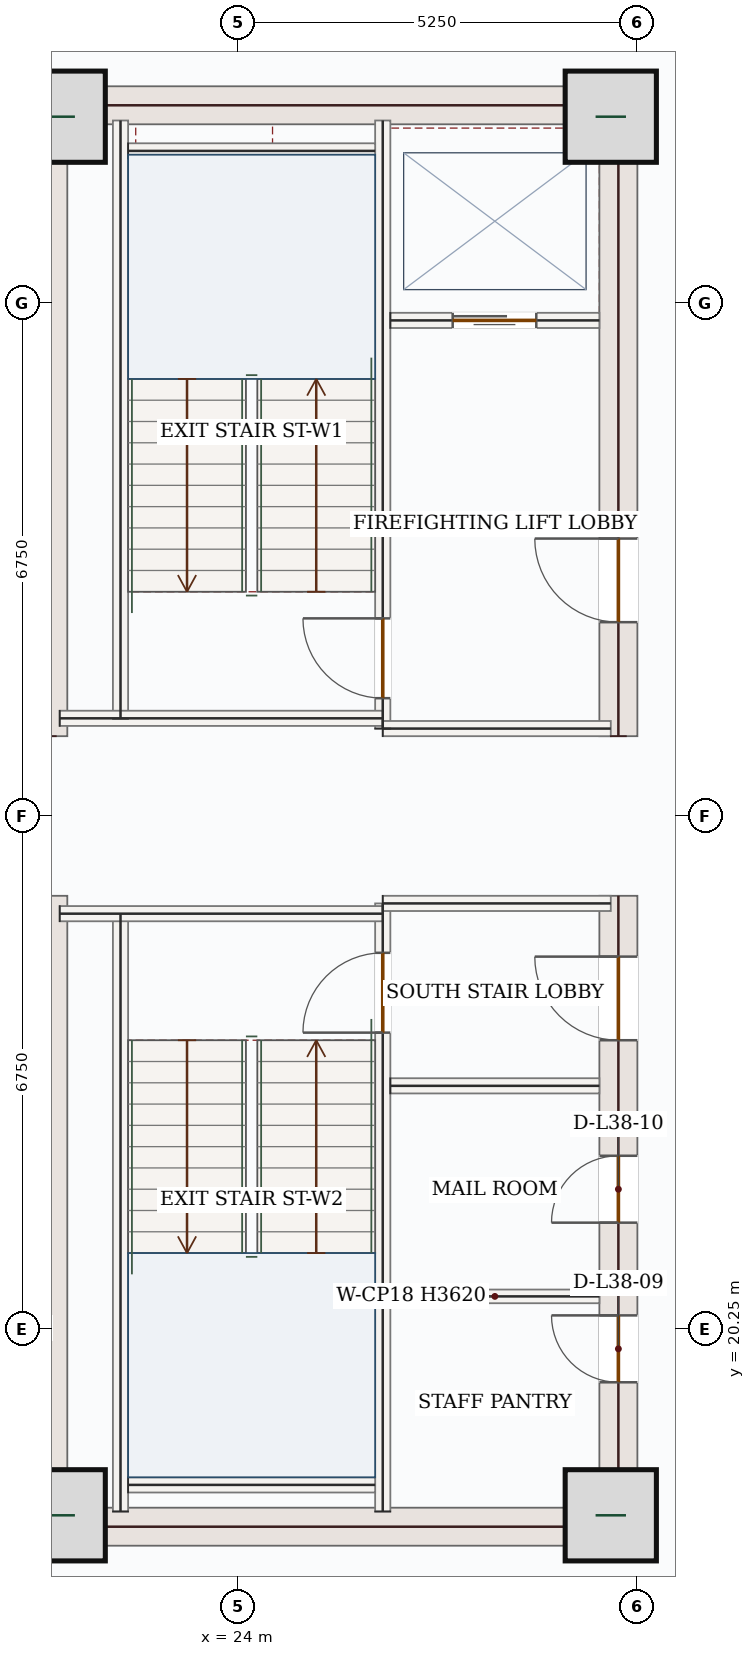
"""IFC4 building model, lengths in metres.
Left out: names, types, materials, properties, quantities, classifications, styles, units other than length and angle.
Written with IfcOpenShell. Run it as: python <this file> out.ifc"""

import sys

from ifc_helpers import new_model, si_unit, direction, frame, frame_2d, origin, origin_2d, place, context, subcontext, project, spatial, rectangle, extrude, source, transform, mapped, element, fill, save


model = new_model("IFC4")
c1 = context("Model", 3, precision=1e-05, world=origin(), true_north=direction((0.0, 1.0)))
c2 = subcontext(c1, "Body", "Model", "MODEL_VIEW")
j1 = project(units=[si_unit("LENGTHUNIT", "METRE"), si_unit("PLANEANGLEUNIT", "RADIAN")], contexts=[c1])
p1 = place(None, origin())
s1 = spatial("IfcSite", under=j1, at=p1, CompositionType="ELEMENT")
p2 = place(p1, origin())
s2 = spatial("IfcBuilding", under=s1, at=p2, CompositionType="ELEMENT")
p3 = place(p2, frame((0.0, 0.0, 166.8)))
s3 = spatial("IfcBuildingStorey", under=s2, at=p3, CompositionType="ELEMENT", Elevation=166.8)
m1 = source(origin(), c2, "Body", "SweptSolid", [
    extrude(rectangle(XDim=8.55, YDim=0.5, at=frame_2d((4.275, 0.0))), origin(), (0.0, 0.0, 1.0), 3.62),
])
for number, where, z_axis, x_axis in (
    (1, (21.5, 17.4, 0.0), (0.0, 0.0, 1.0), (0.0, 1.0, 0.0)),
    (2, (21.5, 28.05, 0.0), (0.0, 0.0, 1.0), (0.0, 1.0, 0.0)),
):
    element("IfcWall", number, at=place(p3, frame(where, z_axis=z_axis, x_axis=x_axis)), inside=s3, PredefinedType="SHEAR", context=c2, shape_type="MappedRepresentation", body=[
        mapped(m1, transform((0.0, 0.0, 0.0), x_axis=(1.0, 0.0, 0.0), y_axis=(0.0, 1.0, 0.0), z_axis=(0.0, 0.0, 1.0), scale=1.0)),
    ])
p4 = place(p3, frame((29.0, 17.4, 0.0), z_axis=(0.0, 0.0, 1.0), x_axis=(0.0, 1.0, 0.0)))
e3 = element("IfcWall", 3, at=p4, inside=s3, PredefinedType="SHEAR", context=c2, shape_type="SweptSolid", body=[
    extrude(rectangle(XDim=8.55, YDim=0.5, at=frame_2d((4.275, 0.0))), origin(), (0.0, 0.0, 1.0), 3.62),
])
p5 = place(p4, frame((6.65, 0.0, 0.0)))
e4 = element("IfcOpeningElement", 4, at=p5, cuts=e3, PredefinedType="OPENING", context=c2, shape_type="SweptSolid", body=[
    extrude(rectangle(XDim=1.1, YDim=2.2, at=frame_2d((0.55, 1.1))), frame((0.0, 0.26, 0.0), z_axis=(0.0, -1.0, 0.0), x_axis=(1.0, 0.0, 0.0)), (0.0, 0.0, 1.0), 0.52),
])
p6 = place(p4, frame((2.15, 0.0, 0.0)))
e5 = element("IfcOpeningElement", 5, at=p6, cuts=e3, PredefinedType="OPENING", context=c2, shape_type="SweptSolid", body=[
    extrude(rectangle(XDim=0.88, YDim=2.1, at=frame_2d((0.44, 1.05))), frame((0.0, 0.26, 0.0), z_axis=(0.0, -1.0, 0.0), x_axis=(1.0, 0.0, 0.0)), (0.0, 0.0, 1.0), 0.52),
])
p7 = place(p4, frame((4.25, 0.0, 0.0)))
e6 = element("IfcOpeningElement", 6, at=p7, cuts=e3, PredefinedType="OPENING", context=c2, shape_type="SweptSolid", body=[
    extrude(rectangle(XDim=0.88, YDim=2.1, at=frame_2d((0.44, 1.05))), frame((0.0, 0.26, 0.0), z_axis=(0.0, -1.0, 0.0), x_axis=(1.0, 0.0, 0.0)), (0.0, 0.0, 1.0), 0.52),
])
p8 = place(p3, frame((29.0, 28.05, 0.0), z_axis=(0.0, 0.0, 1.0), x_axis=(0.0, 1.0, 0.0)))
e7 = element("IfcWall", 7, at=p8, inside=s3, PredefinedType="SHEAR", context=c2, shape_type="SweptSolid", body=[
    extrude(rectangle(XDim=8.55, YDim=0.5, at=frame_2d((4.275, 0.0))), origin(), (0.0, 0.0, 1.0), 3.62),
])
p9 = place(p8, frame((1.5, 0.0, 0.0)))
e8 = element("IfcOpeningElement", 8, at=p9, cuts=e7, PredefinedType="OPENING", context=c2, shape_type="SweptSolid", body=[
    extrude(rectangle(XDim=1.1, YDim=2.2, at=frame_2d((0.55, 1.1))), frame((0.0, 0.26, 0.0), z_axis=(0.0, -1.0, 0.0), x_axis=(1.0, 0.0, 0.0)), (0.0, 0.0, 1.0), 0.52),
])
m2 = source(origin(), c2, "Body", "SweptSolid", [
    extrude(rectangle(XDim=7.0, YDim=0.5, at=frame_2d((3.5, 0.0))), origin(), (0.0, 0.0, 1.0), 3.62),
])
for number, where, z_axis, x_axis in (
    (9, (21.75, 17.65, 0.0), (0.0, 0.0, 1.0), (1.0, 0.0, 0.0)),
    (10, (21.75, 36.35, 0.0), (0.0, 0.0, 1.0), (1.0, 0.0, 0.0)),
):
    element("IfcWall", number, at=place(p3, frame(where, z_axis=z_axis, x_axis=x_axis)), inside=s3, PredefinedType="SHEAR", context=c2, shape_type="MappedRepresentation", body=[
        mapped(m2, transform((0.0, 0.0, 0.0), x_axis=(1.0, 0.0, 0.0), y_axis=(0.0, 1.0, 0.0), z_axis=(0.0, 0.0, 1.0), scale=1.0)),
    ])
m3 = source(origin(), c2, "Body", "SweptSolid", [
    extrude(rectangle(XDim=1.2, YDim=1.2, at=origin_2d()), origin(), (0.0, 0.0, 1.0), 3.9),
])
for number, where, z_axis, x_axis in (
    (11, (21.65, 17.8, 0.0), (0.0, 0.0, 1.0), (1.0, 0.0, 0.0)),
    (12, (28.9, 17.8, 0.0), (0.0, 0.0, 1.0), (1.0, 0.0, 0.0)),
    (13, (21.65, 36.2, 0.0), (0.0, 0.0, 1.0), (1.0, 0.0, 0.0)),
    (14, (28.9, 36.2, 0.0), (0.0, 0.0, 1.0), (1.0, 0.0, 0.0)),
):
    element("IfcColumn", number, at=place(p3, frame(where, z_axis=z_axis, x_axis=x_axis)), inside=s3, PredefinedType="COLUMN", context=c2, shape_type="MappedRepresentation", body=[
        mapped(m3, transform((0.0, 0.0, 0.0), x_axis=(1.0, 0.0, 0.0), y_axis=(0.0, 1.0, 0.0), z_axis=(0.0, 0.0, 1.0), scale=1.0)),
    ])
m4 = source(origin(), c2, "Body", "SweptSolid", [
    extrude(rectangle(XDim=3.129, YDim=0.28, at=frame_2d((1.565, 0.0))), origin(), (0.0, 0.0, 1.0), 3.62),
])
p10 = place(p3, frame((22.658, 14.74, 0.0), z_axis=(0.0, 0.0, 1.0), x_axis=(-0.707067771627, 0.707145788594, 0.0)))
e15 = element("IfcWall", 15, at=p10, inside=s3, PredefinedType="SOLIDWALL", context=c2, shape_type="MappedRepresentation", body=[
    mapped(m4, transform((0.0, 0.0, 0.0), x_axis=(1.0, 0.0, 0.0), y_axis=(0.0, 1.0, 0.0), z_axis=(0.0, 0.0, 1.0), scale=1.0)),
])
m5 = source(origin(), c2, "Body", "SweptSolid", [
    extrude(rectangle(XDim=5.258, YDim=0.28, at=frame_2d((2.629, 0.0))), origin(), (0.0, 0.0, 1.0), 3.62),
])
p11 = place(p3, frame((18.94, 35.542, 0.0), z_axis=(0.0, 0.0, 1.0), x_axis=(0.707106781187, 0.707106781187, 0.0)))
e16 = element("IfcWall", 16, at=p11, inside=s3, PredefinedType="SOLIDWALL", context=c2, shape_type="MappedRepresentation", body=[
    mapped(m5, transform((0.0, 0.0, 0.0), x_axis=(1.0, 0.0, 0.0), y_axis=(0.0, 1.0, 0.0), z_axis=(0.0, 0.0, 1.0), scale=1.0)),
])
m6 = source(origin(), c2, "Body", "SweptSolid", [
    extrude(rectangle(XDim=7.87, YDim=0.2, at=frame_2d((3.935, 0.0))), origin(), (0.0, 0.0, 1.0), 3.62),
])
for number, where, z_axis, x_axis in (
    (17, (22.45, 17.85, 0.0), (0.0, 0.0, 1.0), (0.0, 1.0, 0.0)),
    (18, (22.45, 28.28, 0.0), (0.0, 0.0, 1.0), (0.0, 1.0, 0.0)),
):
    element("IfcWall", number, at=place(p3, frame(where, z_axis=z_axis, x_axis=x_axis)), inside=s3, PredefinedType="SOLIDWALL", context=c2, shape_type="MappedRepresentation", body=[
        mapped(m6, transform((0.0, 0.0, 0.0), x_axis=(1.0, 0.0, 0.0), y_axis=(0.0, 1.0, 0.0), z_axis=(0.0, 0.0, 1.0), scale=1.0)),
    ])
p12 = place(p3, frame((25.9, 17.85, 0.0), z_axis=(0.0, 0.0, 1.0), x_axis=(0.0, 1.0, 0.0)))
e19 = element("IfcWall", 19, at=p12, inside=s3, PredefinedType="SOLIDWALL", context=c2, shape_type="SweptSolid", body=[
    extrude(rectangle(XDim=8.0, YDim=0.2, at=frame_2d((4.0, 0.0))), origin(), (0.0, 0.0, 1.0), 3.62),
])
p13 = place(p12, frame((6.3, 0.0, 0.0)))
e20 = element("IfcOpeningElement", 20, at=p13, cuts=e19, PredefinedType="OPENING", context=c2, shape_type="SweptSolid", body=[
    extrude(rectangle(XDim=1.05, YDim=2.15, at=frame_2d((0.525, 1.075))), frame((0.0, 0.11, 0.0), z_axis=(0.0, -1.0, 0.0), x_axis=(1.0, 0.0, 0.0)), (0.0, 0.0, 1.0), 0.22),
])
p14 = place(p3, frame((25.9, 28.15, 0.0), z_axis=(0.0, 0.0, 1.0), x_axis=(0.0, 1.0, 0.0)))
e21 = element("IfcWall", 21, at=p14, inside=s3, PredefinedType="SOLIDWALL", context=c2, shape_type="SweptSolid", body=[
    extrude(rectangle(XDim=8.0, YDim=0.2, at=frame_2d((4.0, 0.0))), origin(), (0.0, 0.0, 1.0), 3.62),
])
p15 = place(p14, frame((0.4, 0.0, 0.0)))
e22 = element("IfcOpeningElement", 22, at=p15, cuts=e21, PredefinedType="OPENING", context=c2, shape_type="SweptSolid", body=[
    extrude(rectangle(XDim=1.05, YDim=2.15, at=frame_2d((0.525, 1.075))), frame((0.0, 0.11, 0.0), z_axis=(0.0, -1.0, 0.0), x_axis=(1.0, 0.0, 0.0)), (0.0, 0.0, 1.0), 0.22),
])
m7 = source(origin(), c2, "Body", "SweptSolid", [
    extrude(rectangle(XDim=4.25, YDim=0.2, at=frame_2d((2.125, 0.0))), origin(), (0.0, 0.0, 1.0), 3.62),
])
p16 = place(p3, frame((21.65, 25.715, 0.0), z_axis=(0.0, 0.0, 1.0), x_axis=(1.0, 0.0, 0.0)))
e23 = element("IfcWall", 23, at=p16, inside=s3, PredefinedType="SOLIDWALL", context=c2, shape_type="MappedRepresentation", body=[
    mapped(m7, transform((0.0, 0.0, 0.0), x_axis=(1.0, 0.0, 0.0), y_axis=(0.0, 1.0, 0.0), z_axis=(0.0, 0.0, 1.0), scale=1.0)),
])
m8 = source(origin(), c2, "Body", "SweptSolid", [
    extrude(rectangle(XDim=3.0, YDim=0.2, at=frame_2d((1.5, 0.0))), origin(), (0.0, 0.0, 1.0), 3.62),
])
p17 = place(p3, frame((25.9, 25.85, 0.0), z_axis=(0.0, 0.0, 1.0), x_axis=(1.0, 0.0, 0.0)))
e24 = element("IfcWall", 24, at=p17, inside=s3, PredefinedType="SOLIDWALL", context=c2, shape_type="MappedRepresentation", body=[
    mapped(m8, transform((0.0, 0.0, 0.0), x_axis=(1.0, 0.0, 0.0), y_axis=(0.0, 1.0, 0.0), z_axis=(0.0, 0.0, 1.0), scale=1.0)),
])
p18 = place(p3, frame((21.65, 28.285, 0.0), z_axis=(0.0, 0.0, 1.0), x_axis=(1.0, 0.0, 0.0)))
e25 = element("IfcWall", 25, at=p18, inside=s3, PredefinedType="SOLIDWALL", context=c2, shape_type="MappedRepresentation", body=[
    mapped(m7, transform((0.0, 0.0, 0.0), x_axis=(1.0, 0.0, 0.0), y_axis=(0.0, 1.0, 0.0), z_axis=(0.0, 0.0, 1.0), scale=1.0)),
])
p19 = place(p3, frame((25.9, 28.15, 0.0), z_axis=(0.0, 0.0, 1.0), x_axis=(1.0, 0.0, 0.0)))
e26 = element("IfcWall", 26, at=p19, inside=s3, PredefinedType="SOLIDWALL", context=c2, shape_type="MappedRepresentation", body=[
    mapped(m8, transform((0.0, 0.0, 0.0), x_axis=(1.0, 0.0, 0.0), y_axis=(0.0, 1.0, 0.0), z_axis=(0.0, 0.0, 1.0), scale=1.0)),
])
m9 = source(origin(), c2, "Body", "SweptSolid", [
    extrude(rectangle(XDim=3.25, YDim=0.2, at=frame_2d((1.625, 0.0))), origin(), (0.0, 0.0, 1.0), 3.62),
])
for number, where, z_axis, x_axis in (
    (27, (22.55, 35.75, 0.0), (0.0, 0.0, 1.0), (1.0, 0.0, 0.0)),
    (28, (22.55, 18.2, 0.0), (0.0, 0.0, 1.0), (1.0, 0.0, 0.0)),
):
    element("IfcWall", number, at=place(p3, frame(where, z_axis=z_axis, x_axis=x_axis)), inside=s3, PredefinedType="SOLIDWALL", context=c2, shape_type="MappedRepresentation", body=[
        mapped(m9, transform((0.0, 0.0, 0.0), x_axis=(1.0, 0.0, 0.0), y_axis=(0.0, 1.0, 0.0), z_axis=(0.0, 0.0, 1.0), scale=1.0)),
    ])
p20 = place(p3, frame((26.0, 33.52, 0.0), z_axis=(0.0, 0.0, 1.0), x_axis=(1.0, 0.0, 0.0)))
e29 = element("IfcWall", 29, at=p20, inside=s3, PredefinedType="SOLIDWALL", context=c2, shape_type="SweptSolid", body=[
    extrude(rectangle(XDim=2.75, YDim=0.2, at=frame_2d((1.375, 0.0))), origin(), (0.0, 0.0, 1.0), 3.62),
])
p21 = place(p20, frame((0.82, 0.0, 0.0)))
e30 = element("IfcOpeningElement", 30, at=p21, cuts=e29, PredefinedType="OPENING", context=c2, shape_type="SweptSolid", body=[
    extrude(rectangle(XDim=1.1, YDim=2.15, at=frame_2d((0.55, 1.075))), frame((0.0, 0.11, 0.0), z_axis=(0.0, -1.0, 0.0), x_axis=(1.0, 0.0, 0.0)), (0.0, 0.0, 1.0), 0.22),
])
m10 = source(origin(), c2, "Body", "SweptSolid", [
    extrude(rectangle(XDim=2.75, YDim=0.2, at=frame_2d((1.375, 0.0))), origin(), (0.0, 0.0, 1.0), 3.62),
])
p22 = place(p3, frame((26.0, 23.45, 0.0), z_axis=(0.0, 0.0, 1.0), x_axis=(1.0, 0.0, 0.0)))
e31 = element("IfcWall", 31, at=p22, inside=s3, PredefinedType="SOLIDWALL", context=c2, shape_type="MappedRepresentation", body=[
    mapped(m10, transform((0.0, 0.0, 0.0), x_axis=(1.0, 0.0, 0.0), y_axis=(0.0, 1.0, 0.0), z_axis=(0.0, 0.0, 1.0), scale=1.0)),
])
m11 = source(origin(), c2, "Body", "SweptSolid", [
    extrude(rectangle(XDim=2.75, YDim=0.18, at=frame_2d((1.375, 0.0))), origin(), (0.0, 0.0, 1.0), 3.62),
])
p23 = place(p3, frame((26.0, 20.68, 0.0), z_axis=(0.0, 0.0, 1.0), x_axis=(1.0, 0.0, 0.0)))
e32 = element("IfcWall", 32, at=p23, inside=s3, PredefinedType="PARTITIONING", context=c2, shape_type="MappedRepresentation", body=[
    mapped(m11, transform((0.0, 0.0, 0.0), x_axis=(1.0, 0.0, 0.0), y_axis=(0.0, 1.0, 0.0), z_axis=(0.0, 0.0, 1.0), scale=1.0)),
])
m12 = source(origin(), c2, "Body", "SweptSolid", [
    extrude(rectangle(XDim=1.05, YDim=2.15, at=frame_2d((0.525, 1.075))), frame((0.0, 0.025, 0.0), z_axis=(0.0, -1.0, 0.0), x_axis=(1.0, 0.0, 0.0)), (0.0, 0.0, 1.0), 0.05),
])
p24 = place(p15, origin())
e33 = element("IfcDoor", 33, at=p24, inside=s3, OperationType="SINGLE_SWING_RIGHT", PredefinedType="DOOR", context=c2, shape_type="MappedRepresentation", body=[
    mapped(m12, transform((0.0, 0.0, 0.0), x_axis=(1.0, 0.0, 0.0), y_axis=(0.0, 1.0, 0.0), z_axis=(0.0, 0.0, 1.0), scale=1.0)),
])
fill(e22, e33)
p25 = place(p13, origin())
e34 = element("IfcDoor", 34, at=p25, inside=s3, OperationType="SINGLE_SWING_LEFT", PredefinedType="DOOR", context=c2, shape_type="MappedRepresentation", body=[
    mapped(m12, transform((0.0, 0.0, 0.0), x_axis=(1.0, 0.0, 0.0), y_axis=(0.0, 1.0, 0.0), z_axis=(0.0, 0.0, 1.0), scale=1.0)),
])
fill(e20, e34)
m13 = source(origin(), c2, "Body", "SweptSolid", [
    extrude(rectangle(XDim=1.1, YDim=2.15, at=frame_2d((0.55, 1.075))), frame((0.0, 0.025, 0.0), z_axis=(0.0, -1.0, 0.0), x_axis=(1.0, 0.0, 0.0)), (0.0, 0.0, 1.0), 0.05),
])
p26 = place(p21, origin())
e35 = element("IfcDoor", 35, at=p26, inside=s3, OperationType="DOUBLE_DOOR_SLIDING", PredefinedType="DOOR", context=c2, shape_type="MappedRepresentation", body=[
    mapped(m13, transform((0.0, 0.0, 0.0), x_axis=(1.0, 0.0, 0.0), y_axis=(0.0, 1.0, 0.0), z_axis=(0.0, 0.0, 1.0), scale=1.0)),
])
fill(e30, e35)
m14 = source(origin(), c2, "Body", "SweptSolid", [
    extrude(rectangle(XDim=1.1, YDim=2.2, at=frame_2d((0.55, 1.1))), frame((0.0, 0.025, 0.0), z_axis=(0.0, -1.0, 0.0), x_axis=(1.0, 0.0, 0.0)), (0.0, 0.0, 1.0), 0.05),
])
p27 = place(p9, origin())
e36 = element("IfcDoor", 36, at=p27, inside=s3, OperationType="SINGLE_SWING_RIGHT", PredefinedType="DOOR", context=c2, shape_type="MappedRepresentation", body=[
    mapped(m14, transform((0.0, 0.0, 0.0), x_axis=(1.0, 0.0, 0.0), y_axis=(0.0, 1.0, 0.0), z_axis=(0.0, 0.0, 1.0), scale=1.0)),
])
fill(e8, e36)
p28 = place(p5, origin())
e37 = element("IfcDoor", 37, at=p28, inside=s3, OperationType="SINGLE_SWING_RIGHT", PredefinedType="DOOR", context=c2, shape_type="MappedRepresentation", body=[
    mapped(m14, transform((0.0, 0.0, 0.0), x_axis=(1.0, 0.0, 0.0), y_axis=(0.0, 1.0, 0.0), z_axis=(0.0, 0.0, 1.0), scale=1.0)),
])
fill(e4, e37)
m15 = source(origin(), c2, "Body", "SweptSolid", [
    extrude(rectangle(XDim=0.88, YDim=2.1, at=frame_2d((0.44, 1.05))), frame((0.0, 0.025, 0.0), z_axis=(0.0, -1.0, 0.0), x_axis=(1.0, 0.0, 0.0)), (0.0, 0.0, 1.0), 0.05),
])
p29 = place(p6, origin())
e38 = element("IfcDoor", 38, at=p29, inside=s3, OperationType="SINGLE_SWING_RIGHT", PredefinedType="DOOR", context=c2, shape_type="MappedRepresentation", body=[
    mapped(m15, transform((0.0, 0.0, 0.0), x_axis=(1.0, 0.0, 0.0), y_axis=(0.0, 1.0, 0.0), z_axis=(0.0, 0.0, 1.0), scale=1.0)),
])
fill(e5, e38)
p30 = place(p7, origin())
e39 = element("IfcDoor", 39, at=p30, inside=s3, OperationType="SINGLE_SWING_LEFT", PredefinedType="DOOR", context=c2, shape_type="MappedRepresentation", body=[
    mapped(m15, transform((0.0, 0.0, 0.0), x_axis=(1.0, 0.0, 0.0), y_axis=(0.0, 1.0, 0.0), z_axis=(0.0, 0.0, 1.0), scale=1.0)),
])
fill(e6, e39)
save(model, sys.argv[1])
